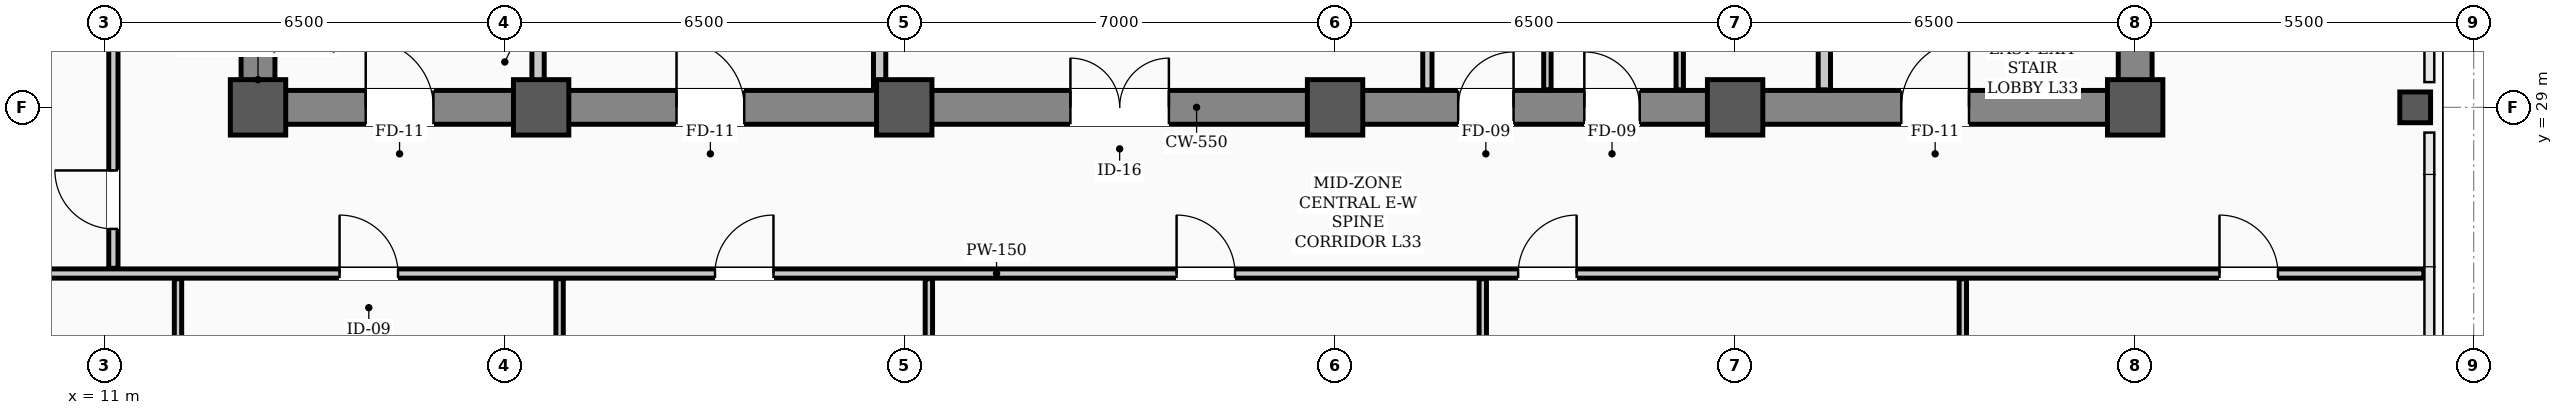
"""IFC4 building model, lengths in metres.
Left out: names, types, materials, properties, quantities, classifications, styles, units other than length and angle.
Written with IfcOpenShell. Run it as: python <this file> out.ifc"""

import sys

from ifc_helpers import new_model, si_unit, direction, frame, frame_2d, origin, origin_2d, place, context, subcontext, project, spatial, rectangle, hollow_rectangle, extrude, element, fill, save


model = new_model("IFC4")
c1 = context("Model", 3, precision=1e-05, world=origin(), true_north=direction((0.0, 1.0)))
c2 = subcontext(c1, "Body", "Model", "MODEL_VIEW")
j1 = project(units=[si_unit("LENGTHUNIT", "METRE"), si_unit("PLANEANGLEUNIT", "RADIAN")], contexts=[c1])
p1 = place(None, origin())
s1 = spatial("IfcSite", under=j1, at=p1, CompositionType="ELEMENT")
p2 = place(p1, origin())
s2 = spatial("IfcBuilding", under=s1, at=p2, CompositionType="ELEMENT")
p3 = place(p2, frame((0.0, 0.0, 134.4)))
s3 = spatial("IfcBuildingStorey", under=s2, at=p3, CompositionType="ELEMENT", Elevation=134.4)
for number, where, z_axis, x_axis in (
    (1, (13.5, 29.0, 0.0), (0.0, 0.0, 1.0), (1.0, 0.0, 0.0)),
    (2, (18.1, 29.0, 0.0), (0.0, 0.0, 1.0), (1.0, 0.0, 0.0)),
    (3, (24.0, 29.0, 0.0), (0.0, 0.0, 1.0), (1.0, 0.0, 0.0)),
    (4, (31.0, 29.0, 0.0), (0.0, 0.0, 1.0), (1.0, 0.0, 0.0)),
    (5, (37.5, 29.0, 0.0), (0.0, 0.0, 1.0), (1.0, 0.0, 0.0)),
    (6, (44.0, 29.0, 0.0), (0.0, 0.0, 1.0), (1.0, 0.0, 0.0)),
):
    element("IfcColumn", number, at=place(p3, frame(where, z_axis=z_axis, x_axis=x_axis)), inside=s3, PredefinedType="COLUMN", context=c2, shape_type="SweptSolid", body=[
        extrude(hollow_rectangle(XDim=0.9, YDim=0.9, WallThickness=0.035, InnerFilletRadius=0.017, OuterFilletRadius=0.052, at=origin_2d()), origin(), (0.0, 0.0, 1.0), 3.9),
    ])
p4 = place(p3, frame((48.55, 29.0, 0.0), z_axis=(0.0, 0.0, 1.0), x_axis=(1.0, 0.0, 0.0)))
e7 = element("IfcColumn", 7, at=p4, inside=s3, PredefinedType="COLUMN", context=c2, shape_type="SweptSolid", body=[
    extrude(hollow_rectangle(XDim=0.5, YDim=0.5, WallThickness=0.024, InnerFilletRadius=0.012, OuterFilletRadius=0.036, at=origin_2d()), origin(), (0.0, 0.0, 1.0), 3.9),
])
p5 = place(p3, frame((13.5, 29.0, 0.0), z_axis=(0.0, 0.0, 1.0), x_axis=(1.0, 0.0, 0.0)))
e8 = element("IfcWall", 8, at=p5, inside=s3, PredefinedType="SHEAR", context=c2, shape_type="SweptSolid", body=[
    extrude(rectangle(XDim=30.5, YDim=0.55, at=frame_2d((15.25, 0.0))), origin(), (0.0, 0.0, 1.0), 3.72),
])
p6 = place(p5, frame((1.75, 0.0, 0.0)))
e9 = element("IfcOpeningElement", 9, at=p6, cuts=e8, PredefinedType="OPENING", context=c2, shape_type="SweptSolid", body=[
    extrude(rectangle(XDim=1.1, YDim=2.08, at=frame_2d((0.55, 1.04))), frame((0.0, 0.285, 0.0), z_axis=(0.0, -1.0, 0.0), x_axis=(1.0, 0.0, 0.0)), (0.0, 0.0, 1.0), 0.57),
])
p7 = place(p5, frame((26.7, 0.0, 0.0)))
e10 = element("IfcOpeningElement", 10, at=p7, cuts=e8, PredefinedType="OPENING", context=c2, shape_type="SweptSolid", body=[
    extrude(rectangle(XDim=1.1, YDim=2.08, at=frame_2d((0.55, 1.04))), frame((0.0, 0.285, 0.0), z_axis=(0.0, -1.0, 0.0), x_axis=(1.0, 0.0, 0.0)), (0.0, 0.0, 1.0), 0.57),
])
p8 = place(p5, frame((6.8, 0.0, 0.0)))
e11 = element("IfcOpeningElement", 11, at=p8, cuts=e8, PredefinedType="OPENING", context=c2, shape_type="SweptSolid", body=[
    extrude(rectangle(XDim=1.1, YDim=2.08, at=frame_2d((0.55, 1.04))), frame((0.0, 0.285, 0.0), z_axis=(0.0, -1.0, 0.0), x_axis=(1.0, 0.0, 0.0)), (0.0, 0.0, 1.0), 0.57),
])
p9 = place(p5, frame((13.2, 0.0, 0.0)))
e12 = element("IfcOpeningElement", 12, at=p9, cuts=e8, PredefinedType="OPENING", context=c2, shape_type="SweptSolid", body=[
    extrude(rectangle(XDim=1.6, YDim=2.08, at=frame_2d((0.8, 1.04))), frame((0.0, 0.285, 0.0), z_axis=(0.0, -1.0, 0.0), x_axis=(1.0, 0.0, 0.0)), (0.0, 0.0, 1.0), 0.57),
])
p10 = place(p5, frame((19.5, 0.0, 0.0)))
e13 = element("IfcOpeningElement", 13, at=p10, cuts=e8, PredefinedType="OPENING", context=c2, shape_type="SweptSolid", body=[
    extrude(rectangle(XDim=0.9, YDim=2.08, at=frame_2d((0.45, 1.04))), frame((0.0, 0.285, 0.0), z_axis=(0.0, -1.0, 0.0), x_axis=(1.0, 0.0, 0.0)), (0.0, 0.0, 1.0), 0.57),
])
p11 = place(p5, frame((21.55, 0.0, 0.0)))
e14 = element("IfcOpeningElement", 14, at=p11, cuts=e8, PredefinedType="OPENING", context=c2, shape_type="SweptSolid", body=[
    extrude(rectangle(XDim=0.9, YDim=2.08, at=frame_2d((0.45, 1.04))), frame((0.0, 0.285, 0.0), z_axis=(0.0, -1.0, 0.0), x_axis=(1.0, 0.0, 0.0)), (0.0, 0.0, 1.0), 0.57),
])
for number, where, z_axis, x_axis in (
    (15, (13.5, 29.35, 0.0), (0.0, 0.0, 1.0), (0.0, 1.0, 0.0)),
    (16, (44.0, 29.35, 0.0), (0.0, 0.0, 1.0), (0.0, 1.0, 0.0)),
):
    element("IfcWall", number, at=place(p3, frame(where, z_axis=z_axis, x_axis=x_axis)), inside=s3, PredefinedType="SHEAR", context=c2, shape_type="SweptSolid", body=[
        extrude(rectangle(XDim=8.6, YDim=0.55, at=frame_2d((4.3, 0.0))), origin(), (0.0, 0.0, 1.0), 3.72),
    ])
p12 = place(p3, frame((2.31, 26.3, 0.0), z_axis=(0.0, 0.0, 1.0), x_axis=(1.0, 0.0, 0.0)))
e17 = element("IfcWall", 17, at=p12, inside=s3, PredefinedType="PARTITIONING", context=c2, shape_type="SweptSolid", body=[
    extrude(rectangle(XDim=46.38, YDim=0.15, at=frame_2d((23.19, 0.0))), origin(), (0.0, 0.0, 1.0), 3.1),
])
p13 = place(p12, frame((12.515, 0.0, 0.0)))
e18 = element("IfcOpeningElement", 18, at=p13, cuts=e17, PredefinedType="OPENING", context=c2, shape_type="SweptSolid", body=[
    extrude(rectangle(XDim=0.95, YDim=2.08, at=frame_2d((0.475, 1.04))), frame((0.0, 0.085, 0.0), z_axis=(0.0, -1.0, 0.0), x_axis=(1.0, 0.0, 0.0)), (0.0, 0.0, 1.0), 0.17),
])
p14 = place(p12, frame((18.615, 0.0, 0.0)))
e19 = element("IfcOpeningElement", 19, at=p14, cuts=e17, PredefinedType="OPENING", context=c2, shape_type="SweptSolid", body=[
    extrude(rectangle(XDim=0.95, YDim=2.08, at=frame_2d((0.475, 1.04))), frame((0.0, 0.085, 0.0), z_axis=(0.0, -1.0, 0.0), x_axis=(1.0, 0.0, 0.0)), (0.0, 0.0, 1.0), 0.17),
])
p15 = place(p12, frame((26.115, 0.0, 0.0)))
e20 = element("IfcOpeningElement", 20, at=p15, cuts=e17, PredefinedType="OPENING", context=c2, shape_type="SweptSolid", body=[
    extrude(rectangle(XDim=0.95, YDim=2.08, at=frame_2d((0.475, 1.04))), frame((0.0, 0.085, 0.0), z_axis=(0.0, -1.0, 0.0), x_axis=(1.0, 0.0, 0.0)), (0.0, 0.0, 1.0), 0.17),
])
p16 = place(p12, frame((31.665, 0.0, 0.0)))
e21 = element("IfcOpeningElement", 21, at=p16, cuts=e17, PredefinedType="OPENING", context=c2, shape_type="SweptSolid", body=[
    extrude(rectangle(XDim=0.95, YDim=2.08, at=frame_2d((0.475, 1.04))), frame((0.0, 0.085, 0.0), z_axis=(0.0, -1.0, 0.0), x_axis=(1.0, 0.0, 0.0)), (0.0, 0.0, 1.0), 0.17),
])
p17 = place(p12, frame((43.06, 0.0, 0.0)))
e22 = element("IfcOpeningElement", 22, at=p17, cuts=e17, PredefinedType="OPENING", context=c2, shape_type="SweptSolid", body=[
    extrude(rectangle(XDim=0.95, YDim=2.08, at=frame_2d((0.475, 1.04))), frame((0.0, 0.085, 0.0), z_axis=(0.0, -1.0, 0.0), x_axis=(1.0, 0.0, 0.0)), (0.0, 0.0, 1.0), 0.17),
])
for number, where, z_axis, x_axis in (
    (23, (18.05, 29.285, 0.0), (0.0, 0.0, 1.0), (0.0, 1.0, 0.0)),
    (24, (38.95, 29.285, 0.0), (0.0, 0.0, 1.0), (0.0, 1.0, 0.0)),
):
    element("IfcWall", number, at=place(p3, frame(where, z_axis=z_axis, x_axis=x_axis)), inside=s3, PredefinedType="STANDARD", context=c2, shape_type="SweptSolid", body=[
        extrude(rectangle(XDim=1.015, YDim=0.2, at=frame_2d((0.508, 0.0))), origin(), (0.0, 0.0, 1.0), 3.3),
    ])
p18 = place(p3, frame((23.6, 29.285, 0.0), z_axis=(0.0, 0.0, 1.0), x_axis=(0.0, 1.0, 0.0)))
e25 = element("IfcWall", 25, at=p18, inside=s3, PredefinedType="STANDARD", context=c2, shape_type="SweptSolid", body=[
    extrude(rectangle(XDim=5.415, YDim=0.2, at=frame_2d((2.708, 0.0))), origin(), (0.0, 0.0, 1.0), 3.1),
])
p19 = place(p3, frame((32.5, 29.285, 0.0), z_axis=(0.0, 0.0, 1.0), x_axis=(0.0, 1.0, 0.0)))
e26 = element("IfcWall", 26, at=p19, inside=s3, PredefinedType="PARTITIONING", context=c2, shape_type="SweptSolid", body=[
    extrude(rectangle(XDim=2.48, YDim=0.15, at=frame_2d((1.24, 0.0))), origin(), (0.0, 0.0, 1.0), 3.3),
])
for number, where, z_axis, x_axis in (
    (27, (36.6, 29.285, 0.0), (0.0, 0.0, 1.0), (0.0, 1.0, 0.0)),
    (28, (34.45, 29.285, 0.0), (0.0, 0.0, 1.0), (0.0, 1.0, 0.0)),
):
    element("IfcWall", number, at=place(p3, frame(where, z_axis=z_axis, x_axis=x_axis)), inside=s3, PredefinedType="PARTITIONING", context=c2, shape_type="SweptSolid", body=[
        extrude(rectangle(XDim=2.48, YDim=0.12, at=frame_2d((1.24, 0.0))), origin(), (0.0, 0.0, 1.0), 3.3),
    ])
p20 = place(p3, frame((11.15, 26.385, 0.0), z_axis=(0.0, 0.0, 1.0), x_axis=(0.0, 1.0, 0.0)))
e29 = element("IfcWall", 29, at=p20, inside=s3, PredefinedType="PARTITIONING", context=c2, shape_type="SweptSolid", body=[
    extrude(rectangle(XDim=11.28, YDim=0.15, at=frame_2d((5.64, 0.0))), origin(), (0.0, 0.0, 1.0), 3.0),
])
p21 = place(p20, frame((0.64, 0.0, 0.0)))
e30 = element("IfcOpeningElement", 30, at=p21, cuts=e29, PredefinedType="OPENING", context=c2, shape_type="SweptSolid", body=[
    extrude(rectangle(XDim=0.95, YDim=2.08, at=frame_2d((0.475, 1.04))), frame((0.0, 0.085, 0.0), z_axis=(0.0, -1.0, 0.0), x_axis=(1.0, 0.0, 0.0)), (0.0, 0.0, 1.0), 0.17),
])
p22 = place(p20, frame((8.765, 0.0, 0.0)))
e31 = element("IfcOpeningElement", 31, at=p22, cuts=e29, PredefinedType="OPENING", context=c2, shape_type="SweptSolid", body=[
    extrude(rectangle(XDim=0.95, YDim=2.08, at=frame_2d((0.475, 1.04))), frame((0.0, 0.085, 0.0), z_axis=(0.0, -1.0, 0.0), x_axis=(1.0, 0.0, 0.0)), (0.0, 0.0, 1.0), 0.17),
])
p23 = place(p3, frame((12.2, 10.81, 0.0), z_axis=(0.0, 0.0, 1.0), x_axis=(0.0, 1.0, 0.0)))
e32 = element("IfcWall", 32, at=p23, inside=s3, PredefinedType="PARTITIONING", context=c2, shape_type="SweptSolid", body=[
    extrude(rectangle(XDim=15.405, YDim=0.12, at=frame_2d((7.703, 0.0))), origin(), (0.0, 0.0, 1.0), 3.0),
])
p24 = place(p23, frame((13.415, 0.0, 0.0)))
e33 = element("IfcOpeningElement", 33, at=p24, cuts=e32, PredefinedType="OPENING", context=c2, shape_type="SweptSolid", body=[
    extrude(rectangle(XDim=0.95, YDim=2.08, at=frame_2d((0.475, 1.04))), frame((0.0, 0.07, 0.0), z_axis=(0.0, -1.0, 0.0), x_axis=(1.0, 0.0, 0.0)), (0.0, 0.0, 1.0), 0.14),
])
p25 = place(p3, frame((18.4, 10.81, 0.0), z_axis=(0.0, 0.0, 1.0), x_axis=(0.0, 1.0, 0.0)))
e34 = element("IfcWall", 34, at=p25, inside=s3, PredefinedType="PARTITIONING", context=c2, shape_type="SweptSolid", body=[
    extrude(rectangle(XDim=15.405, YDim=0.12, at=frame_2d((7.703, 0.0))), origin(), (0.0, 0.0, 1.0), 3.0),
])
p26 = place(p3, frame((24.4, 12.57, 0.0), z_axis=(0.0, 0.0, 1.0), x_axis=(0.0, 1.0, 0.0)))
e35 = element("IfcWall", 35, at=p26, inside=s3, PredefinedType="PARTITIONING", context=c2, shape_type="SweptSolid", body=[
    extrude(rectangle(XDim=13.645, YDim=0.12, at=frame_2d((6.823, 0.0))), origin(), (0.0, 0.0, 1.0), 3.0),
])
for number, where, z_axis, x_axis in (
    (36, (33.4, 10.81, 0.0), (0.0, 0.0, 1.0), (0.0, 1.0, 0.0)),
    (37, (41.2, 10.81, 0.0), (0.0, 0.0, 1.0), (0.0, 1.0, 0.0)),
):
    element("IfcWall", number, at=place(p3, frame(where, z_axis=z_axis, x_axis=x_axis)), inside=s3, PredefinedType="PARTITIONING", context=c2, shape_type="SweptSolid", body=[
        extrude(rectangle(XDim=15.405, YDim=0.12, at=frame_2d((7.703, 0.0))), origin(), (0.0, 0.0, 1.0), 3.0),
    ])
p27 = place(p6, origin())
e38 = element("IfcDoor", 38, at=p27, inside=s3, OperationType="SINGLE_SWING_LEFT", PredefinedType="DOOR", context=c2, shape_type="SweptSolid", body=[
    extrude(rectangle(XDim=1.1, YDim=2.08, at=frame_2d((0.55, 1.04))), frame((0.0, 0.025, 0.0), z_axis=(0.0, -1.0, 0.0), x_axis=(1.0, 0.0, 0.0)), (0.0, 0.0, 1.0), 0.05),
])
fill(e9, e38)
p28 = place(p7, origin())
e39 = element("IfcDoor", 39, at=p28, inside=s3, OperationType="SINGLE_SWING_RIGHT", PredefinedType="DOOR", context=c2, shape_type="SweptSolid", body=[
    extrude(rectangle(XDim=1.1, YDim=2.08, at=frame_2d((0.55, 1.04))), frame((0.0, 0.025, 0.0), z_axis=(0.0, -1.0, 0.0), x_axis=(1.0, 0.0, 0.0)), (0.0, 0.0, 1.0), 0.05),
])
fill(e10, e39)
p29 = place(p8, origin())
e40 = element("IfcDoor", 40, at=p29, inside=s3, OperationType="SINGLE_SWING_LEFT", PredefinedType="DOOR", context=c2, shape_type="SweptSolid", body=[
    extrude(rectangle(XDim=1.1, YDim=2.08, at=frame_2d((0.55, 1.04))), frame((0.0, 0.025, 0.0), z_axis=(0.0, -1.0, 0.0), x_axis=(1.0, 0.0, 0.0)), (0.0, 0.0, 1.0), 0.05),
])
fill(e11, e40)
p30 = place(p9, origin())
e41 = element("IfcDoor", 41, at=p30, inside=s3, OperationType="DOUBLE_DOOR_SINGLE_SWING", PredefinedType="DOOR", context=c2, shape_type="SweptSolid", body=[
    extrude(rectangle(XDim=1.6, YDim=2.08, at=frame_2d((0.8, 1.04))), frame((0.0, 0.025, 0.0), z_axis=(0.0, -1.0, 0.0), x_axis=(1.0, 0.0, 0.0)), (0.0, 0.0, 1.0), 0.05),
])
fill(e12, e41)
p31 = place(p10, origin())
e42 = element("IfcDoor", 42, at=p31, inside=s3, OperationType="SINGLE_SWING_RIGHT", PredefinedType="DOOR", context=c2, shape_type="SweptSolid", body=[
    extrude(rectangle(XDim=0.9, YDim=2.08, at=frame_2d((0.45, 1.04))), frame((0.0, 0.025, 0.0), z_axis=(0.0, -1.0, 0.0), x_axis=(1.0, 0.0, 0.0)), (0.0, 0.0, 1.0), 0.05),
])
fill(e13, e42)
p32 = place(p11, origin())
e43 = element("IfcDoor", 43, at=p32, inside=s3, OperationType="SINGLE_SWING_LEFT", PredefinedType="DOOR", context=c2, shape_type="SweptSolid", body=[
    extrude(rectangle(XDim=0.9, YDim=2.08, at=frame_2d((0.45, 1.04))), frame((0.0, 0.025, 0.0), z_axis=(0.0, -1.0, 0.0), x_axis=(1.0, 0.0, 0.0)), (0.0, 0.0, 1.0), 0.05),
])
fill(e14, e43)
p33 = place(p13, origin())
e44 = element("IfcDoor", 44, at=p33, inside=s3, OperationType="SINGLE_SWING_LEFT", PredefinedType="DOOR", context=c2, shape_type="SweptSolid", body=[
    extrude(rectangle(XDim=0.95, YDim=2.08, at=frame_2d((0.475, 1.04))), frame((0.0, 0.025, 0.0), z_axis=(0.0, -1.0, 0.0), x_axis=(1.0, 0.0, 0.0)), (0.0, 0.0, 1.0), 0.05),
])
fill(e18, e44)
p34 = place(p14, origin())
e45 = element("IfcDoor", 45, at=p34, inside=s3, OperationType="SINGLE_SWING_RIGHT", PredefinedType="DOOR", context=c2, shape_type="SweptSolid", body=[
    extrude(rectangle(XDim=0.95, YDim=2.08, at=frame_2d((0.475, 1.04))), frame((0.0, 0.025, 0.0), z_axis=(0.0, -1.0, 0.0), x_axis=(1.0, 0.0, 0.0)), (0.0, 0.0, 1.0), 0.05),
])
fill(e19, e45)
p35 = place(p15, origin())
e46 = element("IfcDoor", 46, at=p35, inside=s3, OperationType="SINGLE_SWING_LEFT", PredefinedType="DOOR", context=c2, shape_type="SweptSolid", body=[
    extrude(rectangle(XDim=0.95, YDim=2.08, at=frame_2d((0.475, 1.04))), frame((0.0, 0.025, 0.0), z_axis=(0.0, -1.0, 0.0), x_axis=(1.0, 0.0, 0.0)), (0.0, 0.0, 1.0), 0.05),
])
fill(e20, e46)
p36 = place(p16, origin())
e47 = element("IfcDoor", 47, at=p36, inside=s3, OperationType="SINGLE_SWING_RIGHT", PredefinedType="DOOR", context=c2, shape_type="SweptSolid", body=[
    extrude(rectangle(XDim=0.95, YDim=2.08, at=frame_2d((0.475, 1.04))), frame((0.0, 0.025, 0.0), z_axis=(0.0, -1.0, 0.0), x_axis=(1.0, 0.0, 0.0)), (0.0, 0.0, 1.0), 0.05),
])
fill(e21, e47)
p37 = place(p17, origin())
e48 = element("IfcDoor", 48, at=p37, inside=s3, OperationType="SINGLE_SWING_LEFT", PredefinedType="DOOR", context=c2, shape_type="SweptSolid", body=[
    extrude(rectangle(XDim=0.95, YDim=2.08, at=frame_2d((0.475, 1.04))), frame((0.0, 0.025, 0.0), z_axis=(0.0, -1.0, 0.0), x_axis=(1.0, 0.0, 0.0)), (0.0, 0.0, 1.0), 0.05),
])
fill(e22, e48)
p38 = place(p21, origin())
e49 = element("IfcDoor", 49, at=p38, inside=s3, OperationType="SINGLE_SWING_RIGHT", PredefinedType="DOOR", context=c2, shape_type="SweptSolid", body=[
    extrude(rectangle(XDim=0.95, YDim=2.08, at=frame_2d((0.475, 1.04))), frame((0.0, 0.025, 0.0), z_axis=(0.0, -1.0, 0.0), x_axis=(1.0, 0.0, 0.0)), (0.0, 0.0, 1.0), 0.05),
])
fill(e30, e49)
save(model, sys.argv[1])
